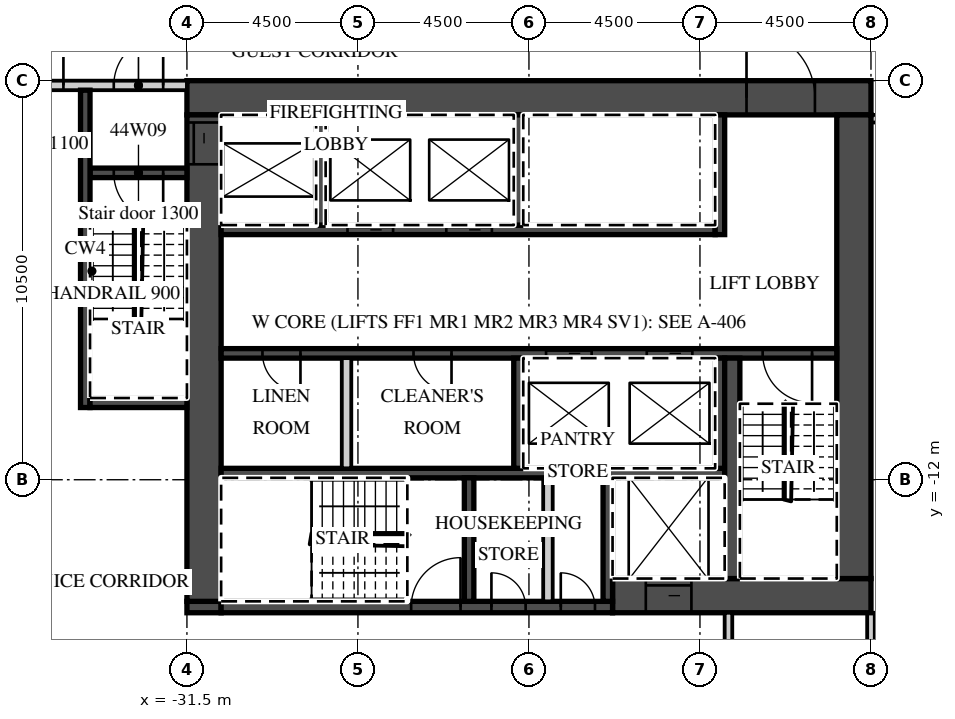
"""IFC4 building model, lengths in metres.
Left out: names, types, materials, properties, quantities, classifications, styles, units other than length and angle.
Written with IfcOpenShell. Run it as: python <this file> out.ifc"""

import sys

from ifc_helpers import new_model, si_unit, direction, frame, frame_2d, origin, place, context, subcontext, project, spatial, rectangle, extrude, element, fill, save


model = new_model("IFC4")
c1 = context("Model", 3, precision=1e-05, world=origin(), true_north=direction((0.0, 1.0)))
c2 = subcontext(c1, "Body", "Model", "MODEL_VIEW")
j1 = project(units=[si_unit("LENGTHUNIT", "METRE"), si_unit("PLANEANGLEUNIT", "RADIAN")], contexts=[c1])
p1 = place(None, origin())
s1 = spatial("IfcSite", under=j1, at=p1, CompositionType="ELEMENT")
p2 = place(p1, origin())
s2 = spatial("IfcBuilding", under=s1, at=p2, CompositionType="ELEMENT")
p3 = place(p2, frame((0.0, 0.0, 186.7)))
s3 = spatial("IfcBuildingStorey", under=s2, at=p3, CompositionType="ELEMENT", Elevation=186.7)
p4 = place(p3, frame((-13.5, -22.3, 0.0), z_axis=(0.0, 0.0, 1.0), x_axis=(0.0, 1.0, 0.0)))
e1 = element("IfcWall", 1, at=p4, inside=s3, PredefinedType="PARTITIONING", context=c2, shape_type="SweptSolid", body=[
    extrude(rectangle(XDim=6.8, YDim=0.2, at=frame_2d((3.4, 0.0))), origin(), (0.0, 0.0, 1.0), 3.02),
])
p5 = place(p3, frame((-13.5, -2.5, 0.0), z_axis=(0.0, 0.0, 1.0), x_axis=(1.0, 0.0, 0.0)))
e2 = element("IfcWall", 2, at=p5, inside=s3, PredefinedType="PARTITIONING", context=c2, shape_type="SweptSolid", body=[
    extrude(rectangle(XDim=27.0, YDim=0.2, at=frame_2d((13.5, 0.0))), origin(), (0.0, 0.0, 1.0), 3.02),
])
p6 = place(p5, frame((0.575, 0.0, 0.0)))
e3 = element("IfcOpeningElement", 3, at=p6, cuts=e2, PredefinedType="OPENING", context=c2, shape_type="SweptSolid", body=[
    extrude(rectangle(XDim=1.0, YDim=2.1, at=frame_2d((0.5, 1.05))), frame((0.0, 0.11, 0.0), z_axis=(0.0, -1.0, 0.0), x_axis=(1.0, 0.0, 0.0)), (0.0, 0.0, 1.0), 0.22),
])
p7 = place(p5, frame((7.45, 0.0, 0.0)))
e4 = element("IfcOpeningElement", 4, at=p7, cuts=e2, PredefinedType="OPENING", context=c2, shape_type="SweptSolid", body=[
    extrude(rectangle(XDim=1.0, YDim=2.1, at=frame_2d((0.5, 1.05))), frame((0.0, 0.11, 0.0), z_axis=(0.0, -1.0, 0.0), x_axis=(1.0, 0.0, 0.0)), (0.0, 0.0, 1.0), 0.22),
])
p8 = place(p5, frame((9.55, 0.0, 0.0)))
e5 = element("IfcOpeningElement", 5, at=p8, cuts=e2, PredefinedType="OPENING", context=c2, shape_type="SweptSolid", body=[
    extrude(rectangle(XDim=1.0, YDim=2.1, at=frame_2d((0.5, 1.05))), frame((0.0, 0.11, 0.0), z_axis=(0.0, -1.0, 0.0), x_axis=(1.0, 0.0, 0.0)), (0.0, 0.0, 1.0), 0.22),
])
p9 = place(p5, frame((18.862, 0.0, 0.0)))
e6 = element("IfcOpeningElement", 6, at=p9, cuts=e2, PredefinedType="OPENING", context=c2, shape_type="SweptSolid", body=[
    extrude(rectangle(XDim=1.2, YDim=2.1, at=frame_2d((0.6, 1.05))), frame((0.0, 0.11, 0.0), z_axis=(0.0, -1.0, 0.0), x_axis=(1.0, 0.0, 0.0)), (0.0, 0.0, 1.0), 0.22),
])
p10 = place(p5, frame((23.075, 0.0, 0.0)))
e7 = element("IfcOpeningElement", 7, at=p10, cuts=e2, PredefinedType="OPENING", context=c2, shape_type="SweptSolid", body=[
    extrude(rectangle(XDim=1.0, YDim=2.1, at=frame_2d((0.5, 1.05))), frame((0.0, 0.11, 0.0), z_axis=(0.0, -1.0, 0.0), x_axis=(1.0, 0.0, 0.0)), (0.0, 0.0, 1.0), 0.22),
])
p11 = place(p3, frame((-31.5, -1.95, 0.0), z_axis=(0.0, 0.0, 1.0), x_axis=(1.0, 0.0, 0.0)))
e8 = element("IfcWall", 8, at=p11, inside=s3, PredefinedType="SHEAR", context=c2, shape_type="SweptSolid", body=[
    extrude(rectangle(XDim=18.0, YDim=0.9, at=frame_2d((9.0, 0.0))), origin(), (0.0, 0.0, 1.0), 3.02),
])
p12 = place(p11, frame((14.725, 0.0, 0.0)))
e9 = element("IfcOpeningElement", 9, at=p12, cuts=e8, PredefinedType="OPENING", context=c2, shape_type="SweptSolid", body=[
    extrude(rectangle(XDim=1.8, YDim=2.1, at=frame_2d((0.9, 1.05))), frame((0.0, 0.46, 0.0), z_axis=(0.0, -1.0, 0.0), x_axis=(1.0, 0.0, 0.0)), (0.0, 0.0, 1.0), 0.92),
])
p13 = place(p3, frame((-20.3, -15.05, 0.0), z_axis=(0.0, 0.0, 1.0), x_axis=(1.0, 0.0, 0.0)))
e10 = element("IfcWall", 10, at=p13, inside=s3, PredefinedType="SHEAR", context=c2, shape_type="SweptSolid", body=[
    extrude(rectangle(XDim=6.8, YDim=0.9, at=frame_2d((3.4, 0.0))), origin(), (0.0, 0.0, 1.0), 3.02),
])
p14 = place(p13, frame((0.875, 0.0, 0.0)))
e11 = element("IfcOpeningElement", 11, at=p14, cuts=e10, PredefinedType="OPENING", context=c2, shape_type="SweptSolid", body=[
    extrude(rectangle(XDim=1.2, YDim=2.1, at=frame_2d((0.6, 1.05))), frame((0.0, 0.46, 0.0), z_axis=(0.0, -1.0, 0.0), x_axis=(1.0, 0.0, 0.0)), (0.0, 0.0, 1.0), 0.92),
])
p15 = place(p3, frame((-31.5, -15.35, 0.0), z_axis=(0.0, 0.0, 1.0), x_axis=(1.0, 0.0, 0.0)))
e12 = element("IfcWall", 12, at=p15, inside=s3, PredefinedType="SHEAR", context=c2, shape_type="SweptSolid", body=[
    extrude(rectangle(XDim=0.9, YDim=0.3, at=frame_2d((0.45, 0.0))), origin(), (0.0, 0.0, 1.0), 3.02),
])
p16 = place(p3, frame((-30.6, -15.35, 0.0), z_axis=(0.0, 0.0, 1.0), x_axis=(1.0, 0.0, 0.0)))
e13 = element("IfcWall", 13, at=p16, inside=s3, PredefinedType="SHEAR", context=c2, shape_type="SweptSolid", body=[
    extrude(rectangle(XDim=10.3, YDim=0.3, at=frame_2d((5.15, 0.0))), origin(), (0.0, 0.0, 1.0), 3.02),
])
p17 = place(p16, frame((5.0, 0.0, 0.0)))
e14 = element("IfcOpeningElement", 14, at=p17, cuts=e13, PredefinedType="OPENING", context=c2, shape_type="SweptSolid", body=[
    extrude(rectangle(XDim=1.3, YDim=2.1, at=frame_2d((0.65, 1.05))), frame((0.0, 0.16, 0.0), z_axis=(0.0, -1.0, 0.0), x_axis=(1.0, 0.0, 0.0)), (0.0, 0.0, 1.0), 0.32),
])
p18 = place(p16, frame((7.113, 0.0, 0.0)))
e15 = element("IfcOpeningElement", 15, at=p18, cuts=e13, PredefinedType="OPENING", context=c2, shape_type="SweptSolid", body=[
    extrude(rectangle(XDim=0.9, YDim=2.1, at=frame_2d((0.45, 1.05))), frame((0.0, 0.16, 0.0), z_axis=(0.0, -1.0, 0.0), x_axis=(1.0, 0.0, 0.0)), (0.0, 0.0, 1.0), 0.32),
])
p19 = place(p16, frame((8.938, 0.0, 0.0)))
e16 = element("IfcOpeningElement", 16, at=p19, cuts=e13, PredefinedType="OPENING", context=c2, shape_type="SweptSolid", body=[
    extrude(rectangle(XDim=0.9, YDim=2.1, at=frame_2d((0.45, 1.05))), frame((0.0, 0.16, 0.0), z_axis=(0.0, -1.0, 0.0), x_axis=(1.0, 0.0, 0.0)), (0.0, 0.0, 1.0), 0.32),
])
p20 = place(p3, frame((-31.05, -15.2, 0.0), z_axis=(0.0, 0.0, 1.0), x_axis=(0.0, 1.0, 0.0)))
e17 = element("IfcWall", 17, at=p20, inside=s3, PredefinedType="SHEAR", context=c2, shape_type="SweptSolid", body=[
    extrude(rectangle(XDim=12.8, YDim=0.9, at=frame_2d((6.4, 0.0))), origin(), (0.0, 0.0, 1.0), 3.02),
])
p21 = place(p20, frame((11.5, 0.0, 0.0)))
e18 = element("IfcOpeningElement", 18, at=p21, cuts=e17, PredefinedType="OPENING", context=c2, shape_type="SweptSolid", body=[
    extrude(rectangle(XDim=1.1, YDim=2.1, at=frame_2d((0.55, 1.05))), frame((0.0, 0.46, 0.0), z_axis=(0.0, -1.0, 0.0), x_axis=(1.0, 0.0, 0.0)), (0.0, 0.0, 1.0), 0.92),
])
p22 = place(p3, frame((-13.95, -14.6, 0.0), z_axis=(0.0, 0.0, 1.0), x_axis=(0.0, 1.0, 0.0)))
e19 = element("IfcWall", 19, at=p22, inside=s3, PredefinedType="SHEAR", context=c2, shape_type="SweptSolid", body=[
    extrude(rectangle(XDim=12.2, YDim=0.9, at=frame_2d((6.1, 0.0))), origin(), (0.0, 0.0, 1.0), 3.02),
])
p23 = place(p3, frame((-30.6, -5.425, 0.0), z_axis=(0.0, 0.0, 1.0), x_axis=(1.0, 0.0, 0.0)))
e20 = element("IfcWall", 20, at=p23, inside=s3, PredefinedType="SHEAR", context=c2, shape_type="SweptSolid", body=[
    extrude(rectangle(XDim=13.0, YDim=0.25, at=frame_2d((6.5, 0.0))), origin(), (0.0, 0.0, 1.0), 3.02),
])
p24 = place(p23, frame((3.325, 0.0, 0.0)))
e21 = element("IfcOpeningElement", 21, at=p24, cuts=e20, PredefinedType="OPENING", context=c2, shape_type="SweptSolid", body=[
    extrude(rectangle(XDim=1.2, YDim=2.1, at=frame_2d((0.6, 1.05))), frame((0.0, 0.135, 0.0), z_axis=(0.0, -1.0, 0.0), x_axis=(1.0, 0.0, 0.0)), (0.0, 0.0, 1.0), 0.27),
])
p25 = place(p23, frame((5.925, 0.0, 0.0)))
e22 = element("IfcOpeningElement", 22, at=p25, cuts=e20, PredefinedType="OPENING", context=c2, shape_type="SweptSolid", body=[
    extrude(rectangle(XDim=1.2, YDim=2.1, at=frame_2d((0.6, 1.05))), frame((0.0, 0.135, 0.0), z_axis=(0.0, -1.0, 0.0), x_axis=(1.0, 0.0, 0.0)), (0.0, 0.0, 1.0), 0.27),
])
p26 = place(p3, frame((-17.475, -5.55, 0.0), z_axis=(0.0, 0.0, 1.0), x_axis=(0.0, 1.0, 0.0)))
e23 = element("IfcWall", 23, at=p26, inside=s3, PredefinedType="SHEAR", context=c2, shape_type="SweptSolid", body=[
    extrude(rectangle(XDim=3.15, YDim=0.25, at=frame_2d((1.575, 0.0))), origin(), (0.0, 0.0, 1.0), 3.02),
])
for number, where, z_axis, x_axis in (
    (24, (-27.975, -5.3, 0.0), (0.0, 0.0, 1.0), (0.0, 1.0, 0.0)),
    (25, (-22.775, -5.3, 0.0), (0.0, 0.0, 1.0), (0.0, 1.0, 0.0)),
):
    element("IfcWall", number, at=place(p3, frame(where, z_axis=z_axis, x_axis=x_axis)), inside=s3, PredefinedType="SHEAR", context=c2, shape_type="SweptSolid", body=[
        extrude(rectangle(XDim=2.9, YDim=0.25, at=frame_2d((1.45, 0.0))), origin(), (0.0, 0.0, 1.0), 3.02),
    ])
p27 = place(p3, frame((-30.6, -8.675, 0.0), z_axis=(0.0, 0.0, 1.0), x_axis=(1.0, 0.0, 0.0)))
e26 = element("IfcWall", 26, at=p27, inside=s3, PredefinedType="SHEAR", context=c2, shape_type="SweptSolid", body=[
    extrude(rectangle(XDim=16.2, YDim=0.25, at=frame_2d((8.1, 0.0))), origin(), (0.0, 0.0, 1.0), 3.02),
])
p28 = place(p27, frame((8.55, 0.0, 0.0)))
e27 = element("IfcOpeningElement", 27, at=p28, cuts=e26, PredefinedType="OPENING", context=c2, shape_type="SweptSolid", body=[
    extrude(rectangle(XDim=1.2, YDim=2.1, at=frame_2d((0.6, 1.05))), frame((0.0, 0.135, 0.0), z_axis=(0.0, -1.0, 0.0), x_axis=(1.0, 0.0, 0.0)), (0.0, 0.0, 1.0), 0.27),
])
p29 = place(p27, frame((11.2, 0.0, 0.0)))
e28 = element("IfcOpeningElement", 28, at=p29, cuts=e26, PredefinedType="OPENING", context=c2, shape_type="SweptSolid", body=[
    extrude(rectangle(XDim=1.2, YDim=2.1, at=frame_2d((0.6, 1.05))), frame((0.0, 0.135, 0.0), z_axis=(0.0, -1.0, 0.0), x_axis=(1.0, 0.0, 0.0)), (0.0, 0.0, 1.0), 0.27),
])
p30 = place(p27, frame((14.25, 0.0, 0.0)))
e29 = element("IfcOpeningElement", 29, at=p30, cuts=e26, PredefinedType="OPENING", context=c2, shape_type="SweptSolid", body=[
    extrude(rectangle(XDim=1.3, YDim=2.1, at=frame_2d((0.65, 1.05))), frame((0.0, 0.135, 0.0), z_axis=(0.0, -1.0, 0.0), x_axis=(1.0, 0.0, 0.0)), (0.0, 0.0, 1.0), 0.27),
])
p31 = place(p27, frame((1.087, 0.0, 0.0)))
e30 = element("IfcOpeningElement", 30, at=p31, cuts=e26, PredefinedType="OPENING", context=c2, shape_type="SweptSolid", body=[
    extrude(rectangle(XDim=1.0, YDim=2.1, at=frame_2d((0.5, 1.05))), frame((0.0, 0.135, 0.0), z_axis=(0.0, -1.0, 0.0), x_axis=(1.0, 0.0, 0.0)), (0.0, 0.0, 1.0), 0.27),
])
p32 = place(p27, frame((5.062, 0.0, 0.0)))
e31 = element("IfcOpeningElement", 31, at=p32, cuts=e26, PredefinedType="OPENING", context=c2, shape_type="SweptSolid", body=[
    extrude(rectangle(XDim=1.0, YDim=2.1, at=frame_2d((0.5, 1.05))), frame((0.0, 0.135, 0.0), z_axis=(0.0, -1.0, 0.0), x_axis=(1.0, 0.0, 0.0)), (0.0, 0.0, 1.0), 0.27),
])
p33 = place(p3, frame((-30.6, -11.825, 0.0), z_axis=(0.0, 0.0, 1.0), x_axis=(1.0, 0.0, 0.0)))
e32 = element("IfcWall", 32, at=p33, inside=s3, PredefinedType="SHEAR", context=c2, shape_type="SweptSolid", body=[
    extrude(rectangle(XDim=13.25, YDim=0.25, at=frame_2d((6.625, 0.0))), origin(), (0.0, 0.0, 1.0), 3.02),
])
for number, where, z_axis, x_axis in (
    (33, (-17.475, -11.7, 0.0), (0.0, 0.0, 1.0), (0.0, 1.0, 0.0)),
    (34, (-22.775, -11.7, 0.0), (0.0, 0.0, 1.0), (0.0, 1.0, 0.0)),
):
    element("IfcWall", number, at=place(p3, frame(where, z_axis=z_axis, x_axis=x_axis)), inside=s3, PredefinedType="SHEAR", context=c2, shape_type="SweptSolid", body=[
        extrude(rectangle(XDim=2.9, YDim=0.25, at=frame_2d((1.45, 0.0))), origin(), (0.0, 0.0, 1.0), 3.02),
    ])
p34 = place(p3, frame((-27.3, -11.7, 0.0), z_axis=(0.0, 0.0, 1.0), x_axis=(0.0, 1.0, 0.0)))
e35 = element("IfcWall", 35, at=p34, inside=s3, PredefinedType="PARTITIONING", context=c2, shape_type="SweptSolid", body=[
    extrude(rectangle(XDim=2.9, YDim=0.25, at=frame_2d((1.45, 0.0))), origin(), (0.0, 0.0, 1.0), 3.02),
])
p35 = place(p3, frame((-17.15, -14.6, 0.0), z_axis=(0.0, 0.0, 1.0), x_axis=(0.0, 1.0, 0.0)))
e36 = element("IfcWall", 36, at=p35, inside=s3, PredefinedType="SHEAR", context=c2, shape_type="SweptSolid", body=[
    extrude(rectangle(XDim=5.8, YDim=0.4, at=frame_2d((2.9, 0.0))), origin(), (0.0, 0.0, 1.0), 3.02),
])
for number, where, z_axis, x_axis in (
    (37, (-20.425, -15.2, 0.0), (0.0, 0.0, 1.0), (0.0, 1.0, 0.0)),
    (38, (-24.075, -15.2, 0.0), (0.0, 0.0, 1.0), (0.0, 1.0, 0.0)),
):
    element("IfcWall", number, at=place(p3, frame(where, z_axis=z_axis, x_axis=x_axis)), inside=s3, PredefinedType="SHEAR", context=c2, shape_type="SweptSolid", body=[
        extrude(rectangle(XDim=3.25, YDim=0.25, at=frame_2d((1.625, 0.0))), origin(), (0.0, 0.0, 1.0), 3.02),
    ])
p36 = place(p3, frame((-22.0, -15.2, 0.0), z_axis=(0.0, 0.0, 1.0), x_axis=(0.0, 1.0, 0.0)))
e39 = element("IfcWall", 39, at=p36, inside=s3, PredefinedType="PARTITIONING", context=c2, shape_type="SweptSolid", body=[
    extrude(rectangle(XDim=3.25, YDim=0.25, at=frame_2d((1.625, 0.0))), origin(), (0.0, 0.0, 1.0), 3.02),
])
p37 = place(p3, frame((-42.632, -1.625, 0.0), z_axis=(0.0, 0.0, 1.0), x_axis=(1.0, 0.0, 0.0)))
e40 = element("IfcWall", 40, at=p37, inside=s3, PredefinedType="PARTITIONING", context=c2, shape_type="SweptSolid", body=[
    extrude(rectangle(XDim=11.132, YDim=0.25, at=frame_2d((5.566, 0.0))), origin(), (0.0, 0.0, 1.0), 3.02),
])
p38 = place(p37, frame((9.207, 0.0, 0.0)))
e41 = element("IfcOpeningElement", 41, at=p38, cuts=e40, PredefinedType="OPENING", context=c2, shape_type="SweptSolid", body=[
    extrude(rectangle(XDim=1.3, YDim=2.1, at=frame_2d((0.65, 1.05))), frame((0.0, 0.135, 0.0), z_axis=(0.0, -1.0, 0.0), x_axis=(1.0, 0.0, 0.0)), (0.0, 0.0, 1.0), 0.27),
])
p39 = place(p37, frame((6.781, 0.0, 0.0)))
e42 = element("IfcOpeningElement", 42, at=p39, cuts=e40, PredefinedType="OPENING", context=c2, shape_type="SweptSolid", body=[
    extrude(rectangle(XDim=1.1, YDim=2.1, at=frame_2d((0.55, 1.05))), frame((0.0, 0.135, 0.0), z_axis=(0.0, -1.0, 0.0), x_axis=(1.0, 0.0, 0.0)), (0.0, 0.0, 1.0), 0.27),
])
p40 = place(p3, frame((-34.05, -3.925, 0.0), z_axis=(0.0, 0.0, 1.0), x_axis=(1.0, 0.0, 0.0)))
e43 = element("IfcWall", 43, at=p40, inside=s3, PredefinedType="SHEAR", context=c2, shape_type="SweptSolid", body=[
    extrude(rectangle(XDim=2.55, YDim=0.25, at=frame_2d((1.275, 0.0))), origin(), (0.0, 0.0, 1.0), 3.02),
])
p41 = place(p40, frame((0.625, 0.0, 0.0)))
e44 = element("IfcOpeningElement", 44, at=p41, cuts=e43, PredefinedType="OPENING", context=c2, shape_type="SweptSolid", body=[
    extrude(rectangle(XDim=1.3, YDim=2.1, at=frame_2d((0.65, 1.05))), frame((0.0, 0.135, 0.0), z_axis=(0.0, -1.0, 0.0), x_axis=(1.0, 0.0, 0.0)), (0.0, 0.0, 1.0), 0.27),
])
p42 = place(p3, frame((-34.175, -10.1, 0.0), z_axis=(0.0, 0.0, 1.0), x_axis=(0.0, 1.0, 0.0)))
e45 = element("IfcWall", 45, at=p42, inside=s3, PredefinedType="SHEAR", context=c2, shape_type="SweptSolid", body=[
    extrude(rectangle(XDim=8.35, YDim=0.25, at=frame_2d((4.175, 0.0))), origin(), (0.0, 0.0, 1.0), 3.02),
])
p43 = place(p3, frame((-34.05, -9.975, 0.0), z_axis=(0.0, 0.0, 1.0), x_axis=(1.0, 0.0, 0.0)))
e46 = element("IfcWall", 46, at=p43, inside=s3, PredefinedType="SHEAR", context=c2, shape_type="SweptSolid", body=[
    extrude(rectangle(XDim=2.55, YDim=0.25, at=frame_2d((1.275, 0.0))), origin(), (0.0, 0.0, 1.0), 3.02),
])
p44 = place(p3, frame((-17.25, -17.7, 0.0), z_axis=(0.0, 0.0, 1.0), x_axis=(0.0, 1.0, 0.0)))
e47 = element("IfcWall", 47, at=p44, inside=s3, PredefinedType="PARTITIONING", context=c2, shape_type="SweptSolid", body=[
    extrude(rectangle(XDim=2.2, YDim=0.2, at=frame_2d((1.1, 0.0))), origin(), (0.0, 0.0, 1.0), 3.02),
])
p45 = place(p28, origin())
e48 = element("IfcDoor", 48, at=p45, inside=s3, OperationType="SLIDING_TO_LEFT", PredefinedType="DOOR", context=c2, shape_type="SweptSolid", body=[
    extrude(rectangle(XDim=1.2, YDim=2.1, at=frame_2d((0.6, 1.05))), frame((0.0, 0.025, 0.0), z_axis=(0.0, -1.0, 0.0), x_axis=(1.0, 0.0, 0.0)), (0.0, 0.0, 1.0), 0.05),
])
fill(e27, e48)
p46 = place(p29, origin())
e49 = element("IfcDoor", 49, at=p46, inside=s3, OperationType="SLIDING_TO_RIGHT", PredefinedType="DOOR", context=c2, shape_type="SweptSolid", body=[
    extrude(rectangle(XDim=1.2, YDim=2.1, at=frame_2d((0.6, 1.05))), frame((0.0, 0.025, 0.0), z_axis=(0.0, -1.0, 0.0), x_axis=(1.0, 0.0, 0.0)), (0.0, 0.0, 1.0), 0.05),
])
fill(e28, e49)
p47 = place(p24, origin())
e50 = element("IfcDoor", 50, at=p47, inside=s3, OperationType="SLIDING_TO_RIGHT", PredefinedType="DOOR", context=c2, shape_type="SweptSolid", body=[
    extrude(rectangle(XDim=1.2, YDim=2.1, at=frame_2d((0.6, 1.05))), frame((0.0, 0.025, 0.0), z_axis=(0.0, -1.0, 0.0), x_axis=(1.0, 0.0, 0.0)), (0.0, 0.0, 1.0), 0.05),
])
fill(e21, e50)
p48 = place(p25, origin())
e51 = element("IfcDoor", 51, at=p48, inside=s3, OperationType="SLIDING_TO_RIGHT", PredefinedType="DOOR", context=c2, shape_type="SweptSolid", body=[
    extrude(rectangle(XDim=1.2, YDim=2.1, at=frame_2d((0.6, 1.05))), frame((0.0, 0.025, 0.0), z_axis=(0.0, -1.0, 0.0), x_axis=(1.0, 0.0, 0.0)), (0.0, 0.0, 1.0), 0.05),
])
fill(e22, e51)
p49 = place(p14, origin())
e52 = element("IfcDoor", 52, at=p49, inside=s3, OperationType="SLIDING_TO_LEFT", PredefinedType="DOOR", context=c2, shape_type="SweptSolid", body=[
    extrude(rectangle(XDim=1.2, YDim=2.1, at=frame_2d((0.6, 1.05))), frame((0.0, 0.025, 0.0), z_axis=(0.0, -1.0, 0.0), x_axis=(1.0, 0.0, 0.0)), (0.0, 0.0, 1.0), 0.05),
])
fill(e11, e52)
p50 = place(p21, origin())
e53 = element("IfcDoor", 53, at=p50, inside=s3, OperationType="SLIDING_TO_RIGHT", PredefinedType="DOOR", context=c2, shape_type="SweptSolid", body=[
    extrude(rectangle(XDim=1.1, YDim=2.1, at=frame_2d((0.55, 1.05))), frame((0.0, 0.025, 0.0), z_axis=(0.0, -1.0, 0.0), x_axis=(1.0, 0.0, 0.0)), (0.0, 0.0, 1.0), 0.05),
])
fill(e18, e53)
p51 = place(p12, origin())
e54 = element("IfcDoor", 54, at=p51, inside=s3, OperationType="DOUBLE_DOOR_DOUBLE_SWING", PredefinedType="DOOR", context=c2, shape_type="SweptSolid", body=[
    extrude(rectangle(XDim=1.8, YDim=2.1, at=frame_2d((0.9, 1.05))), frame((0.0, 0.025, 0.0), z_axis=(0.0, -1.0, 0.0), x_axis=(1.0, 0.0, 0.0)), (0.0, 0.0, 1.0), 0.05),
])
fill(e9, e54)
p52 = place(p38, origin())
e55 = element("IfcDoor", 55, at=p52, inside=s3, OperationType="SINGLE_SWING_RIGHT", PredefinedType="DOOR", context=c2, shape_type="SweptSolid", body=[
    extrude(rectangle(XDim=1.3, YDim=2.1, at=frame_2d((0.65, 1.05))), frame((0.0, 0.025, 0.0), z_axis=(0.0, -1.0, 0.0), x_axis=(1.0, 0.0, 0.0)), (0.0, 0.0, 1.0), 0.05),
])
fill(e41, e55)
p53 = place(p41, origin())
e56 = element("IfcDoor", 56, at=p53, inside=s3, OperationType="SINGLE_SWING_RIGHT", PredefinedType="DOOR", context=c2, shape_type="SweptSolid", body=[
    extrude(rectangle(XDim=1.3, YDim=2.1, at=frame_2d((0.65, 1.05))), frame((0.0, 0.025, 0.0), z_axis=(0.0, -1.0, 0.0), x_axis=(1.0, 0.0, 0.0)), (0.0, 0.0, 1.0), 0.05),
])
fill(e44, e56)
p54 = place(p39, origin())
e57 = element("IfcDoor", 57, at=p54, inside=s3, OperationType="SINGLE_SWING_RIGHT", PredefinedType="DOOR", context=c2, shape_type="SweptSolid", body=[
    extrude(rectangle(XDim=1.1, YDim=2.1, at=frame_2d((0.55, 1.05))), frame((0.0, 0.025, 0.0), z_axis=(0.0, -1.0, 0.0), x_axis=(1.0, 0.0, 0.0)), (0.0, 0.0, 1.0), 0.05),
])
fill(e42, e57)
p55 = place(p30, origin())
e58 = element("IfcDoor", 58, at=p55, inside=s3, OperationType="SINGLE_SWING_RIGHT", PredefinedType="DOOR", context=c2, shape_type="SweptSolid", body=[
    extrude(rectangle(XDim=1.3, YDim=2.1, at=frame_2d((0.65, 1.05))), frame((0.0, 0.025, 0.0), z_axis=(0.0, -1.0, 0.0), x_axis=(1.0, 0.0, 0.0)), (0.0, 0.0, 1.0), 0.05),
])
fill(e29, e58)
p56 = place(p17, origin())
e59 = element("IfcDoor", 59, at=p56, inside=s3, OperationType="SINGLE_SWING_RIGHT", PredefinedType="DOOR", context=c2, shape_type="SweptSolid", body=[
    extrude(rectangle(XDim=1.3, YDim=2.1, at=frame_2d((0.65, 1.05))), frame((0.0, 0.025, 0.0), z_axis=(0.0, -1.0, 0.0), x_axis=(1.0, 0.0, 0.0)), (0.0, 0.0, 1.0), 0.05),
])
fill(e14, e59)
p57 = place(p18, origin())
e60 = element("IfcDoor", 60, at=p57, inside=s3, OperationType="SINGLE_SWING_LEFT", PredefinedType="DOOR", context=c2, shape_type="SweptSolid", body=[
    extrude(rectangle(XDim=0.9, YDim=2.1, at=frame_2d((0.45, 1.05))), frame((0.0, 0.025, 0.0), z_axis=(0.0, -1.0, 0.0), x_axis=(1.0, 0.0, 0.0)), (0.0, 0.0, 1.0), 0.05),
])
fill(e15, e60)
p58 = place(p19, origin())
e61 = element("IfcDoor", 61, at=p58, inside=s3, OperationType="SINGLE_SWING_LEFT", PredefinedType="DOOR", context=c2, shape_type="SweptSolid", body=[
    extrude(rectangle(XDim=0.9, YDim=2.1, at=frame_2d((0.45, 1.05))), frame((0.0, 0.025, 0.0), z_axis=(0.0, -1.0, 0.0), x_axis=(1.0, 0.0, 0.0)), (0.0, 0.0, 1.0), 0.05),
])
fill(e16, e61)
p59 = place(p31, origin())
e62 = element("IfcDoor", 62, at=p59, inside=s3, OperationType="SINGLE_SWING_RIGHT", PredefinedType="DOOR", context=c2, shape_type="SweptSolid", body=[
    extrude(rectangle(XDim=1.0, YDim=2.1, at=frame_2d((0.5, 1.05))), frame((0.0, 0.025, 0.0), z_axis=(0.0, -1.0, 0.0), x_axis=(1.0, 0.0, 0.0)), (0.0, 0.0, 1.0), 0.05),
])
fill(e30, e62)
p60 = place(p32, origin())
e63 = element("IfcDoor", 63, at=p60, inside=s3, OperationType="SINGLE_SWING_RIGHT", PredefinedType="DOOR", context=c2, shape_type="SweptSolid", body=[
    extrude(rectangle(XDim=1.0, YDim=2.1, at=frame_2d((0.5, 1.05))), frame((0.0, 0.025, 0.0), z_axis=(0.0, -1.0, 0.0), x_axis=(1.0, 0.0, 0.0)), (0.0, 0.0, 1.0), 0.05),
])
fill(e31, e63)
save(model, sys.argv[1])
